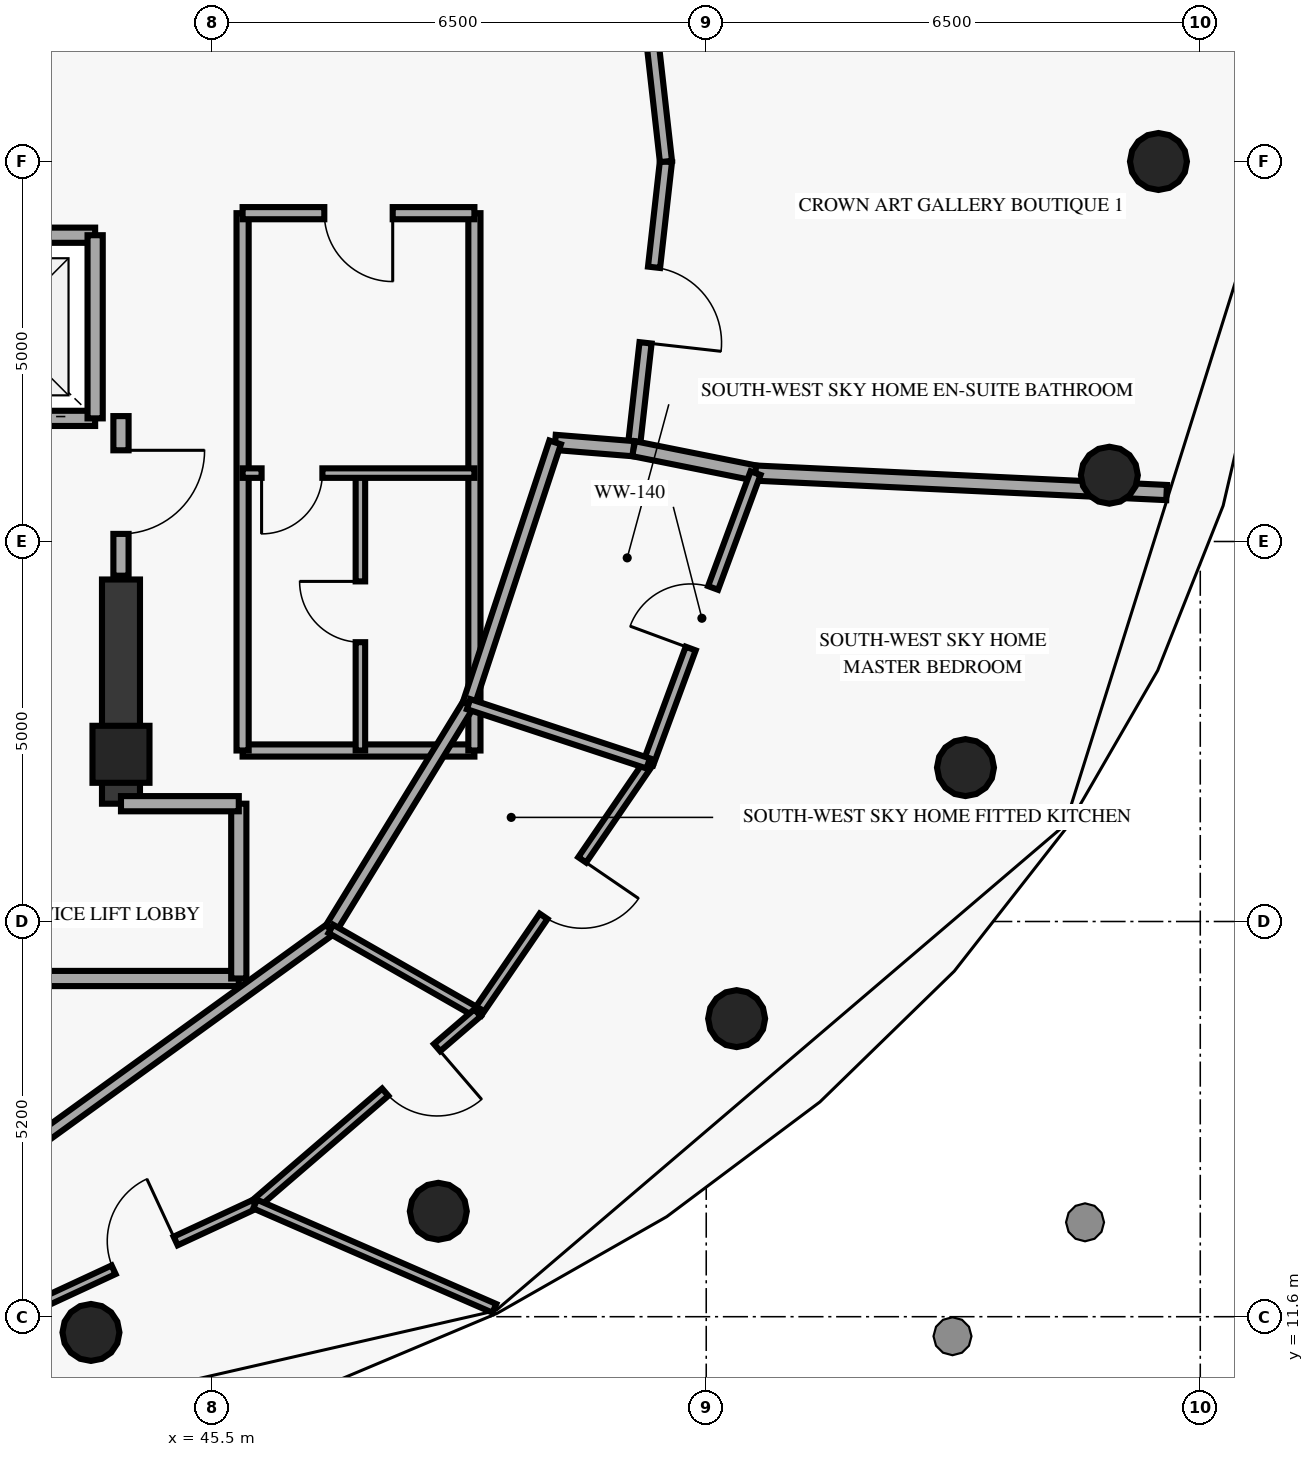
"""IFC4 building model, lengths in metres.
Left out: names, types, materials, properties, quantities, classifications, styles, units other than length and angle.
Written with IfcOpenShell. Run it as: python <this file> out.ifc"""

import sys

from ifc_helpers import new_model, si_unit, direction, frame, frame_2d, origin, origin_2d, place, context, subcontext, project, spatial, rectangle, circle, extrude, element, fill, save


model = new_model("IFC4")
c1 = context("Model", 3, precision=1e-05, world=origin(), true_north=direction((0.0, 1.0)))
c2 = subcontext(c1, "Body", "Model", "MODEL_VIEW")
j1 = project(units=[si_unit("LENGTHUNIT", "METRE"), si_unit("PLANEANGLEUNIT", "RADIAN")], contexts=[c1])
p1 = place(None, origin())
s1 = spatial("IfcSite", under=j1, at=p1, CompositionType="ELEMENT")
p2 = place(p1, origin())
s2 = spatial("IfcBuilding", under=s1, at=p2, CompositionType="ELEMENT")
p3 = place(p2, frame((0.0, 0.0, 255.6)))
s3 = spatial("IfcBuildingStorey", under=s2, at=p3, CompositionType="ELEMENT", Elevation=255.6)
p4 = place(p3, frame((44.3, 19.0, 0.0), z_axis=(0.0, 0.0, 1.0), x_axis=(1.0, 0.0, 0.0)))
e1 = element("IfcColumn", 1, at=p4, inside=s3, PredefinedType="PILASTER", context=c2, shape_type="SweptSolid", body=[
    extrude(rectangle(XDim=0.75, YDim=0.75, at=origin_2d()), origin(), (0.0, 0.0, 1.0), 3.54),
])
for number, where, z_axis, x_axis in (
    (2, (57.95, 26.8, 0.0), (0.0, 0.0, 1.0), (1.0, 0.0, 0.0)),
    (3, (43.905, 11.393, 0.0), (0.0, 0.0, 1.0), (1.0, 0.0, 0.0)),
    (4, (48.475, 12.987, 0.0), (0.0, 0.0, 1.0), (1.0, 0.0, 0.0)),
    (5, (52.4, 15.522, 0.0), (0.0, 0.0, 1.0), (1.0, 0.0, 0.0)),
    (6, (55.411, 18.825, 0.0), (0.0, 0.0, 1.0), (1.0, 0.0, 0.0)),
    (7, (57.304, 22.672, 0.0), (0.0, 0.0, 1.0), (1.0, 0.0, 0.0)),
):
    element("IfcColumn", number, at=place(p3, frame(where, z_axis=z_axis, x_axis=x_axis)), inside=s3, PredefinedType="COLUMN", context=c2, shape_type="SweptSolid", body=[
        extrude(circle(Radius=0.375, at=origin_2d()), origin(), (0.0, 0.0, 1.0), 3.54),
    ])
p5 = place(p3, frame((44.3, 18.35, 0.0), z_axis=(0.0, 0.0, 1.0), x_axis=(0.0, 1.0, 0.0)))
e8 = element("IfcWall", 8, at=p5, inside=s3, PredefinedType="SHEAR", context=c2, shape_type="SweptSolid", body=[
    extrude(rectangle(XDim=2.95, YDim=0.5, at=frame_2d((1.475, 0.0))), origin(), (0.0, 0.0, 1.0), 3.54),
])
p6 = place(p3, frame((41.46, 23.42, 0.0), z_axis=(0.0, 0.0, 1.0), x_axis=(1.0, 0.0, 0.0)))
e9 = element("IfcWall", 9, at=p6, inside=s3, PredefinedType="SOLIDWALL", context=c2, shape_type="SweptSolid", body=[
    extrude(rectangle(XDim=2.5, YDim=0.2, at=frame_2d((1.25, 0.0))), origin(), (0.0, 0.0, 1.0), 3.54),
])
p7 = place(p6, frame((0.7, 0.0, 0.0)))
e10 = element("IfcOpeningElement", 10, at=p7, cuts=e9, PredefinedType="OPENING", context=c2, shape_type="SweptSolid", body=[
    extrude(rectangle(XDim=1.1, YDim=2.15, at=frame_2d((0.55, 1.075))), frame((0.0, 0.11, 0.0), z_axis=(0.0, -1.0, 0.0), x_axis=(1.0, 0.0, 0.0)), (0.0, 0.0, 1.0), 0.22),
])
p8 = place(p3, frame((41.46, 25.83, 0.0), z_axis=(0.0, 0.0, 1.0), x_axis=(1.0, 0.0, 0.0)))
e11 = element("IfcWall", 11, at=p8, inside=s3, PredefinedType="SOLIDWALL", context=c2, shape_type="SweptSolid", body=[
    extrude(rectangle(XDim=2.5, YDim=0.2, at=frame_2d((1.25, 0.0))), origin(), (0.0, 0.0, 1.0), 3.54),
])
p9 = place(p3, frame((43.96, 23.42, 0.0), z_axis=(0.0, 0.0, 1.0), x_axis=(0.0, 1.0, 0.0)))
e12 = element("IfcWall", 12, at=p9, inside=s3, PredefinedType="SOLIDWALL", context=c2, shape_type="SweptSolid", body=[
    extrude(rectangle(XDim=2.41, YDim=0.2, at=frame_2d((1.205, 0.0))), origin(), (0.0, 0.0, 1.0), 3.54),
])
p10 = place(p3, frame((45.9, 19.05, 0.0), z_axis=(0.0, 0.0, 1.0), x_axis=(1.0, 0.0, 0.0)))
e13 = element("IfcWall", 13, at=p10, inside=s3, PredefinedType="PARTITIONING", context=c2, shape_type="SweptSolid", body=[
    extrude(rectangle(XDim=3.05, YDim=0.16, at=frame_2d((1.525, 0.0))), origin(), (0.0, 0.0, 1.0), 3.54),
])
for number, where, z_axis, x_axis in (
    (14, (48.95, 19.05, 0.0), (0.0, 0.0, 1.0), (0.0, 1.0, 0.0)),
    (15, (45.9, 19.05, 0.0), (0.0, 0.0, 1.0), (0.0, 1.0, 0.0)),
):
    element("IfcWall", number, at=place(p3, frame(where, z_axis=z_axis, x_axis=x_axis)), inside=s3, PredefinedType="PARTITIONING", context=c2, shape_type="SweptSolid", body=[
        extrude(rectangle(XDim=7.07, YDim=0.16, at=frame_2d((3.535, 0.0))), origin(), (0.0, 0.0, 1.0), 3.54),
    ])
p11 = place(p3, frame((47.45, 22.7, 0.0), z_axis=(0.0, 0.0, 1.0), x_axis=(0.0, -1.0, 0.0)))
e16 = element("IfcWall", 16, at=p11, inside=s3, PredefinedType="PARTITIONING", context=c2, shape_type="SweptSolid", body=[
    extrude(rectangle(XDim=3.65, YDim=0.125, at=frame_2d((1.825, 0.0))), origin(), (0.0, 0.0, 1.0), 3.54),
])
p12 = place(p11, frame((1.425, 0.0, 0.0)))
e17 = element("IfcOpeningElement", 17, at=p12, cuts=e16, PredefinedType="OPENING", context=c2, shape_type="SweptSolid", body=[
    extrude(rectangle(XDim=0.8, YDim=2.05, at=frame_2d((0.4, 1.025))), frame((0.0, 0.073, 0.0), z_axis=(0.0, -1.0, 0.0), x_axis=(1.0, 0.0, 0.0)), (0.0, 0.0, 1.0), 0.145),
])
p13 = place(p3, frame((48.95, 22.7, 0.0), z_axis=(0.0, 0.0, 1.0), x_axis=(-1.0, 0.0, 0.0)))
e18 = element("IfcWall", 18, at=p13, inside=s3, PredefinedType="PARTITIONING", context=c2, shape_type="SweptSolid", body=[
    extrude(rectangle(XDim=3.05, YDim=0.125, at=frame_2d((1.525, 0.0))), origin(), (0.0, 0.0, 1.0), 3.54),
])
p14 = place(p13, frame((2.0, 0.0, 0.0)))
e19 = element("IfcOpeningElement", 19, at=p14, cuts=e18, PredefinedType="OPENING", context=c2, shape_type="SweptSolid", body=[
    extrude(rectangle(XDim=0.8, YDim=2.05, at=frame_2d((0.4, 1.025))), frame((0.0, 0.073, 0.0), z_axis=(0.0, -1.0, 0.0), x_axis=(1.0, 0.0, 0.0)), (0.0, 0.0, 1.0), 0.145),
])
p15 = place(p3, frame((48.95, 26.12, 0.0), z_axis=(0.0, 0.0, 1.0), x_axis=(-1.0, 0.0, 0.0)))
e20 = element("IfcWall", 20, at=p15, inside=s3, PredefinedType="PARTITIONING", context=c2, shape_type="SweptSolid", body=[
    extrude(rectangle(XDim=3.05, YDim=0.16, at=frame_2d((1.525, 0.0))), origin(), (0.0, 0.0, 1.0), 3.54),
])
p16 = place(p15, frame((1.075, 0.0, 0.0)))
e21 = element("IfcOpeningElement", 21, at=p16, cuts=e20, PredefinedType="OPENING", context=c2, shape_type="SweptSolid", body=[
    extrude(rectangle(XDim=0.9, YDim=2.1, at=frame_2d((0.45, 1.05))), frame((0.0, 0.09, 0.0), z_axis=(0.0, -1.0, 0.0), x_axis=(1.0, 0.0, 0.0)), (0.0, 0.0, 1.0), 0.18),
])
p17 = place(p3, frame((44.3, 21.35, 0.0), z_axis=(0.0, 0.0, 1.0), x_axis=(0.0, 1.0, 0.0)))
e22 = element("IfcWall", 22, at=p17, inside=s3, PredefinedType="SOLIDWALL", context=c2, shape_type="SweptSolid", body=[
    extrude(rectangle(XDim=2.1, YDim=0.2, at=frame_2d((1.05, 0.0))), origin(), (0.0, 0.0, 1.0), 2.925),
])
p18 = place(p17, frame((0.55, 0.0, 0.0)))
e23 = element("IfcOpeningElement", 23, at=p18, cuts=e22, PredefinedType="OPENING", context=c2, shape_type="SweptSolid", body=[
    extrude(rectangle(XDim=1.1, YDim=2.15, at=frame_2d((0.55, 1.075))), frame((0.0, 0.11, 0.0), z_axis=(0.0, -1.0, 0.0), x_axis=(1.0, 0.0, 0.0)), (0.0, 0.0, 1.0), 0.22),
])
p19 = place(p3, frame((41.35, 16.05, 0.0), z_axis=(0.0, 0.0, 1.0), x_axis=(1.0, 0.0, 0.0)))
e24 = element("IfcWall", 24, at=p19, inside=s3, PredefinedType="SOLIDWALL", context=c2, shape_type="SweptSolid", body=[
    extrude(rectangle(XDim=4.5, YDim=0.2, at=frame_2d((2.25, 0.0))), origin(), (0.0, 0.0, 1.0), 3.54),
])
p20 = place(p3, frame((45.85, 16.05, 0.0), z_axis=(0.0, 0.0, 1.0), x_axis=(0.0, 1.0, 0.0)))
e25 = element("IfcWall", 25, at=p20, inside=s3, PredefinedType="SOLIDWALL", context=c2, shape_type="SweptSolid", body=[
    extrude(rectangle(XDim=2.3, YDim=0.2, at=frame_2d((1.15, 0.0))), origin(), (0.0, 0.0, 1.0), 3.54),
])
p21 = place(p3, frame((44.3, 18.35, 0.0), z_axis=(0.0, 0.0, 1.0), x_axis=(1.0, 0.0, 0.0)))
e26 = element("IfcWall", 26, at=p21, inside=s3, PredefinedType="SOLIDWALL", context=c2, shape_type="SweptSolid", body=[
    extrude(rectangle(XDim=1.55, YDim=0.2, at=frame_2d((0.775, 0.0))), origin(), (0.0, 0.0, 1.0), 3.54),
])
p22 = place(p3, frame((51.47, 26.8, 0.0), z_axis=(0.0, 0.0, 1.0), x_axis=(-0.111770206893, -0.993734079546, 0.0)))
e27 = element("IfcWall", 27, at=p22, inside=s3, PredefinedType="PARTITIONING", context=c2, shape_type="SweptSolid", body=[
    extrude(rectangle(XDim=3.803, YDim=0.16, at=frame_2d((1.901, 0.0))), origin(), (0.0, 0.0, 1.0), 3.54),
])
p23 = place(p22, frame((1.401, 0.0, 0.0)))
e28 = element("IfcOpeningElement", 28, at=p23, cuts=e27, PredefinedType="OPENING", context=c2, shape_type="SweptSolid", body=[
    extrude(rectangle(XDim=1.0, YDim=2.15, at=frame_2d((0.5, 1.075))), frame((0.0, 0.09, 0.0), z_axis=(0.0, -1.0, 0.0), x_axis=(1.0, 0.0, 0.0)), (0.0, 0.0, 1.0), 0.18),
])
p24 = place(p3, frame((51.47, 26.8, 0.0), z_axis=(0.0, 0.0, 1.0), x_axis=(-0.111770206893, 0.993734079546, 0.0)))
e29 = element("IfcWall", 29, at=p24, inside=s3, PredefinedType="PARTITIONING", context=c2, shape_type="SweptSolid", body=[
    extrude(rectangle(XDim=3.803, YDim=0.16, at=frame_2d((1.901, 0.0))), origin(), (0.0, 0.0, 1.0), 3.54),
])
p25 = place(p3, frame((50.012, 23.104, 0.0), z_axis=(0.0, 0.0, 1.0), x_axis=(0.996786749309, -0.080101038706, 0.0)))
e30 = element("IfcWall", 30, at=p25, inside=s3, PredefinedType="PARTITIONING", context=c2, shape_type="SweptSolid", body=[
    extrude(rectangle(XDim=1.036, YDim=0.2, at=frame_2d((0.518, 0.0))), origin(), (0.0, 0.0, 1.0), 3.54),
])
p26 = place(p3, frame((51.045, 23.021, 0.0), z_axis=(0.0, 0.0, 1.0), x_axis=(0.980551963868, -0.196259639648, 0.0)))
e31 = element("IfcWall", 31, at=p26, inside=s3, PredefinedType="PARTITIONING", context=c2, shape_type="SweptSolid", body=[
    extrude(rectangle(XDim=1.636, YDim=0.2, at=frame_2d((0.818, 0.0))), origin(), (0.0, 0.0, 1.0), 3.54),
])
p27 = place(p3, frame((52.649, 22.7, 0.0), z_axis=(0.0, 0.0, 1.0), x_axis=(0.998882680054, -0.047258771554, 0.0)))
e32 = element("IfcWall", 32, at=p27, inside=s3, PredefinedType="PARTITIONING", context=c2, shape_type="SweptSolid", body=[
    extrude(rectangle(XDim=5.414, YDim=0.2, at=frame_2d((2.707, 0.0))), origin(), (0.0, 0.0, 1.0), 3.54),
])
p28 = place(p3, frame((41.951, 13.007, 0.0), z_axis=(0.0, 0.0, 1.0), x_axis=(0.810290119061, 0.586028943784, 0.0)))
e33 = element("IfcWall", 33, at=p28, inside=s3, PredefinedType="PARTITIONING", context=c2, shape_type="SweptSolid", body=[
    extrude(rectangle(XDim=6.306, YDim=0.16, at=frame_2d((3.153, 0.0))), origin(), (0.0, 0.0, 1.0), 3.54),
])
p29 = place(p3, frame((47.061, 16.703, 0.0), z_axis=(0.0, 0.0, 1.0), x_axis=(0.522486120877, 0.852647789823, 0.0)))
e34 = element("IfcWall", 34, at=p29, inside=s3, PredefinedType="PARTITIONING", context=c2, shape_type="SweptSolid", body=[
    extrude(rectangle(XDim=3.468, YDim=0.16, at=frame_2d((1.734, 0.0))), origin(), (0.0, 0.0, 1.0), 3.54),
])
p30 = place(p3, frame((48.873, 19.66, 0.0), z_axis=(0.0, 0.0, 1.0), x_axis=(0.313965508334, 0.949434389295, 0.0)))
e35 = element("IfcWall", 35, at=p30, inside=s3, PredefinedType="PARTITIONING", context=c2, shape_type="SweptSolid", body=[
    extrude(rectangle(XDim=3.627, YDim=0.16, at=frame_2d((1.814, 0.0))), origin(), (0.0, 0.0, 1.0), 3.54),
])
p31 = place(p3, frame((51.237, 18.88, 0.0), z_axis=(0.0, 0.0, 1.0), x_axis=(-0.5649172284, -0.825147577744, 0.0)))
e36 = element("IfcWall", 36, at=p31, inside=s3, PredefinedType="PARTITIONING", context=c2, shape_type="SweptSolid", body=[
    extrude(rectangle(XDim=3.976, YDim=0.125, at=frame_2d((1.988, 0.0))), origin(), (0.0, 0.0, 1.0), 3.54),
])
p32 = place(p31, frame((1.538, 0.0, 0.0)))
e37 = element("IfcOpeningElement", 37, at=p32, cuts=e36, PredefinedType="OPENING", context=c2, shape_type="SweptSolid", body=[
    extrude(rectangle(XDim=0.9, YDim=2.1, at=frame_2d((0.45, 1.05))), frame((0.0, 0.073, 0.0), z_axis=(0.0, -1.0, 0.0), x_axis=(1.0, 0.0, 0.0)), (0.0, 0.0, 1.0), 0.145),
])
p33 = place(p3, frame((52.649, 22.7, 0.0), z_axis=(0.0, 0.0, 1.0), x_axis=(-0.346671925992, -0.937986447519, 0.0)))
e38 = element("IfcWall", 38, at=p33, inside=s3, PredefinedType="PARTITIONING", context=c2, shape_type="SweptSolid", body=[
    extrude(rectangle(XDim=4.073, YDim=0.14, at=frame_2d((2.036, 0.0))), origin(), (0.0, 0.0, 1.0), 3.54),
])
p34 = place(p33, frame((1.611, 0.0, 0.0)))
e39 = element("IfcOpeningElement", 39, at=p34, cuts=e38, PredefinedType="OPENING", context=c2, shape_type="SweptSolid", body=[
    extrude(rectangle(XDim=0.85, YDim=2.1, at=frame_2d((0.425, 1.05))), frame((0.0, 0.08, 0.0), z_axis=(0.0, -1.0, 0.0), x_axis=(1.0, 0.0, 0.0)), (0.0, 0.0, 1.0), 0.16),
])
p35 = place(p3, frame((47.061, 16.703, 0.0), z_axis=(0.0, 0.0, 1.0), x_axis=(0.868060627231, -0.496458203126, 0.0)))
e40 = element("IfcWall", 40, at=p35, inside=s3, PredefinedType="PARTITIONING", context=c2, shape_type="SweptSolid", body=[
    extrude(rectangle(XDim=2.223, YDim=0.125, at=frame_2d((1.112, 0.0))), origin(), (0.0, 0.0, 1.0), 3.54),
])
p36 = place(p3, frame((48.873, 19.66, 0.0), z_axis=(0.0, 0.0, 1.0), x_axis=(0.949640030913, -0.313342961765, 0.0)))
e41 = element("IfcWall", 41, at=p36, inside=s3, PredefinedType="PARTITIONING", context=c2, shape_type="SweptSolid", body=[
    extrude(rectangle(XDim=2.489, YDim=0.14, at=frame_2d((1.245, 0.0))), origin(), (0.0, 0.0, 1.0), 3.54),
])
p37 = place(p3, frame((46.065, 13.082, 0.0), z_axis=(0.0, 0.0, 1.0), x_axis=(-0.907032898502, -0.421059759459, 0.0)))
e42 = element("IfcWall", 42, at=p37, inside=s3, PredefinedType="PARTITIONING", context=c2, shape_type="SweptSolid", body=[
    extrude(rectangle(XDim=3.757, YDim=0.125, at=frame_2d((1.879, 0.0))), origin(), (0.0, 0.0, 1.0), 3.54),
])
p38 = place(p37, frame((1.153, 0.0, 0.0)))
e43 = element("IfcOpeningElement", 43, at=p38, cuts=e42, PredefinedType="OPENING", context=c2, shape_type="SweptSolid", body=[
    extrude(rectangle(XDim=0.9, YDim=2.1, at=frame_2d((0.45, 1.05))), frame((0.0, 0.073, 0.0), z_axis=(0.0, -1.0, 0.0), x_axis=(1.0, 0.0, 0.0)), (0.0, 0.0, 1.0), 0.145),
])
p39 = place(p3, frame((48.991, 15.599, 0.0), z_axis=(0.0, 0.0, 1.0), x_axis=(-0.758094504626, -0.652144709444, 0.0)))
e44 = element("IfcWall", 44, at=p39, inside=s3, PredefinedType="PARTITIONING", context=c2, shape_type="SweptSolid", body=[
    extrude(rectangle(XDim=3.86, YDim=0.125, at=frame_2d((1.93, 0.0))), origin(), (0.0, 0.0, 1.0), 3.54),
])
p40 = place(p39, frame((0.702, 0.0, 0.0)))
e45 = element("IfcOpeningElement", 45, at=p40, cuts=e44, PredefinedType="OPENING", context=c2, shape_type="SweptSolid", body=[
    extrude(rectangle(XDim=0.9, YDim=2.1, at=frame_2d((0.45, 1.05))), frame((0.0, 0.073, 0.0), z_axis=(0.0, -1.0, 0.0), x_axis=(1.0, 0.0, 0.0)), (0.0, 0.0, 1.0), 0.145),
])
p41 = place(p3, frame((46.065, 13.082, 0.0), z_axis=(0.0, 0.0, 1.0), x_axis=(0.916707983788, -0.399557846199, 0.0)))
e46 = element("IfcWall", 46, at=p41, inside=s3, PredefinedType="PARTITIONING", context=c2, shape_type="SweptSolid", body=[
    extrude(rectangle(XDim=3.434, YDim=0.125, at=frame_2d((1.717, 0.0))), origin(), (0.0, 0.0, 1.0), 3.54),
])
p42 = place(p12, origin())
e47 = element("IfcDoor", 47, at=p42, inside=s3, OperationType="SINGLE_SWING_LEFT", PredefinedType="DOOR", context=c2, shape_type="SweptSolid", body=[
    extrude(rectangle(XDim=0.8, YDim=2.05, at=frame_2d((0.4, 1.025))), frame((0.0, 0.025, 0.0), z_axis=(0.0, -1.0, 0.0), x_axis=(1.0, 0.0, 0.0)), (0.0, 0.0, 1.0), 0.05),
])
fill(e17, e47)
p43 = place(p14, origin())
e48 = element("IfcDoor", 48, at=p43, inside=s3, OperationType="SINGLE_SWING_RIGHT", PredefinedType="DOOR", context=c2, shape_type="SweptSolid", body=[
    extrude(rectangle(XDim=0.8, YDim=2.05, at=frame_2d((0.4, 1.025))), frame((0.0, 0.025, 0.0), z_axis=(0.0, -1.0, 0.0), x_axis=(1.0, 0.0, 0.0)), (0.0, 0.0, 1.0), 0.05),
])
fill(e19, e48)
p44 = place(p16, origin())
e49 = element("IfcDoor", 49, at=p44, inside=s3, OperationType="SINGLE_SWING_LEFT", PredefinedType="DOOR", context=c2, shape_type="SweptSolid", body=[
    extrude(rectangle(XDim=0.9, YDim=2.1, at=frame_2d((0.45, 1.05))), frame((0.0, 0.025, 0.0), z_axis=(0.0, -1.0, 0.0), x_axis=(1.0, 0.0, 0.0)), (0.0, 0.0, 1.0), 0.05),
])
fill(e21, e49)
p45 = place(p18, origin())
e50 = element("IfcDoor", 50, at=p45, inside=s3, OperationType="SINGLE_SWING_RIGHT", PredefinedType="DOOR", context=c2, shape_type="SweptSolid", body=[
    extrude(rectangle(XDim=1.1, YDim=2.15, at=frame_2d((0.55, 1.075))), frame((0.0, 0.025, 0.0), z_axis=(0.0, -1.0, 0.0), x_axis=(1.0, 0.0, 0.0)), (0.0, 0.0, 1.0), 0.05),
])
fill(e23, e50)
p46 = place(p23, origin())
e51 = element("IfcDoor", 51, at=p46, inside=s3, OperationType="SINGLE_SWING_RIGHT", PredefinedType="DOOR", context=c2, shape_type="SweptSolid", body=[
    extrude(rectangle(XDim=1.0, YDim=2.15, at=frame_2d((0.5, 1.075))), frame((0.0, 0.025, 0.0), z_axis=(0.0, -1.0, 0.0), x_axis=(1.0, 0.0, 0.0)), (0.0, 0.0, 1.0), 0.05),
])
fill(e28, e51)
p47 = place(p32, origin())
e52 = element("IfcDoor", 52, at=p47, inside=s3, OperationType="SINGLE_SWING_LEFT", PredefinedType="DOOR", context=c2, shape_type="SweptSolid", body=[
    extrude(rectangle(XDim=0.9, YDim=2.1, at=frame_2d((0.45, 1.05))), frame((0.0, 0.025, 0.0), z_axis=(0.0, -1.0, 0.0), x_axis=(1.0, 0.0, 0.0)), (0.0, 0.0, 1.0), 0.05),
])
fill(e37, e52)
p48 = place(p34, origin())
e53 = element("IfcDoor", 53, at=p48, inside=s3, OperationType="SINGLE_SWING_RIGHT", PredefinedType="DOOR", context=c2, shape_type="SweptSolid", body=[
    extrude(rectangle(XDim=0.85, YDim=2.1, at=frame_2d((0.425, 1.05))), frame((0.0, 0.025, 0.0), z_axis=(0.0, -1.0, 0.0), x_axis=(1.0, 0.0, 0.0)), (0.0, 0.0, 1.0), 0.05),
])
fill(e39, e53)
p49 = place(p38, origin())
e54 = element("IfcDoor", 54, at=p49, inside=s3, OperationType="SINGLE_SWING_LEFT", PredefinedType="DOOR", context=c2, shape_type="SweptSolid", body=[
    extrude(rectangle(XDim=0.9, YDim=2.1, at=frame_2d((0.45, 1.05))), frame((0.0, 0.025, 0.0), z_axis=(0.0, -1.0, 0.0), x_axis=(1.0, 0.0, 0.0)), (0.0, 0.0, 1.0), 0.05),
])
fill(e43, e54)
p50 = place(p40, origin())
e55 = element("IfcDoor", 55, at=p50, inside=s3, OperationType="SINGLE_SWING_LEFT", PredefinedType="DOOR", context=c2, shape_type="SweptSolid", body=[
    extrude(rectangle(XDim=0.9, YDim=2.1, at=frame_2d((0.45, 1.05))), frame((0.0, 0.025, 0.0), z_axis=(0.0, -1.0, 0.0), x_axis=(1.0, 0.0, 0.0)), (0.0, 0.0, 1.0), 0.05),
])
fill(e45, e55)
save(model, sys.argv[1])
